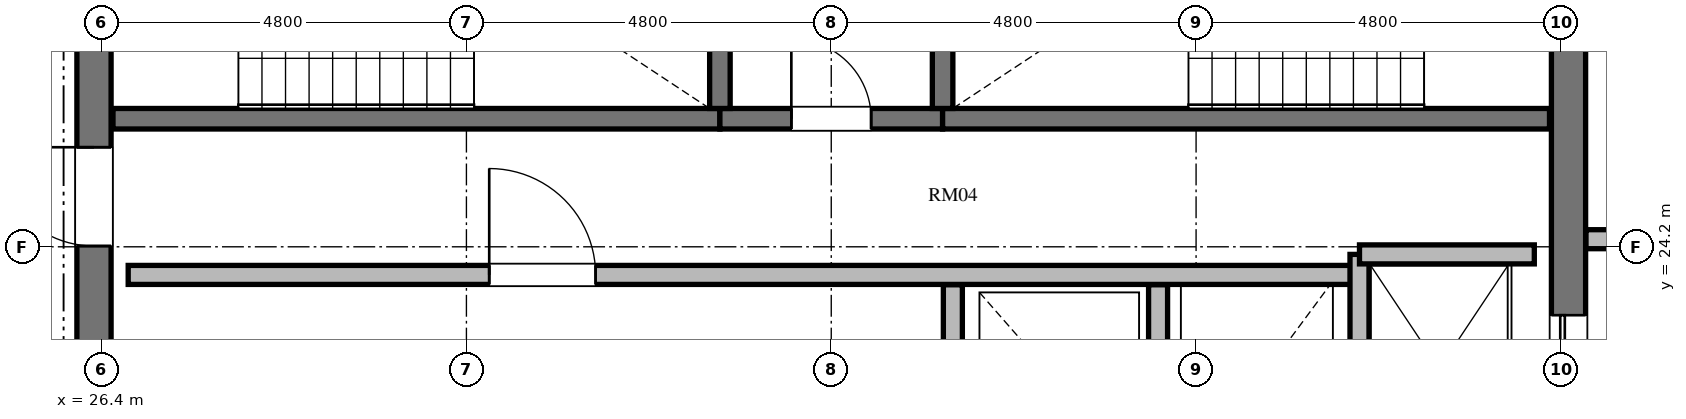
"""IFC4 building model, lengths in metres.
Left out: names, types, materials, properties, quantities, classifications, styles, units other than length and angle.
Written with IfcOpenShell. Run it as: python <this file> out.ifc"""

import sys

from ifc_helpers import new_model, si_unit, direction, frame, frame_2d, origin, place, context, subcontext, project, spatial, rectangle, extrude, element, fill, save


model = new_model("IFC4")
c1 = context("Model", 3, precision=1e-05, world=origin(), true_north=direction((0.0, 1.0)))
c2 = subcontext(c1, "Body", "Model", "MODEL_VIEW")
j1 = project(units=[si_unit("LENGTHUNIT", "METRE"), si_unit("PLANEANGLEUNIT", "RADIAN")], contexts=[c1])
p1 = place(None, origin())
s1 = spatial("IfcSite", under=j1, at=p1, CompositionType="ELEMENT")
p2 = place(p1, origin())
s2 = spatial("IfcBuilding", under=s1, at=p2, CompositionType="ELEMENT")
p3 = place(p2, frame((0.0, 0.0, 302.448)))
s3 = spatial("IfcBuildingStorey", under=s2, at=p3, CompositionType="ELEMENT", Elevation=302.448)
p4 = place(p3, frame((26.3, 20.95, 0.0), z_axis=(0.0, 0.0, 1.0), x_axis=(0.0, 1.0, 0.0)))
e1 = element("IfcWall", 1, at=p4, inside=s3, PredefinedType="SHEAR", context=c2, shape_type="SweptSolid", body=[
    extrude(rectangle(XDim=14.1, YDim=0.45, at=frame_2d((7.05, 0.0))), origin(), (0.0, 0.0, 1.0), 3.388),
])
p5 = place(p4, frame((6.5, 0.0, 0.0)))
e2 = element("IfcOpeningElement", 2, at=p5, cuts=e1, PredefinedType="OPENING", context=c2, shape_type="SweptSolid", body=[
    extrude(rectangle(XDim=1.2, YDim=2.15, at=frame_2d((0.6, 1.075))), frame((0.0, 0.235, 0.0), z_axis=(0.0, -1.0, 0.0), x_axis=(1.0, 0.0, 0.0)), (0.0, 0.0, 1.0), 0.47),
])
p6 = place(p4, frame((9.6, 0.0, 0.0)))
e3 = element("IfcOpeningElement", 3, at=p6, cuts=e1, PredefinedType="OPENING", context=c2, shape_type="SweptSolid", body=[
    extrude(rectangle(XDim=1.3, YDim=2.2, at=frame_2d((0.65, 1.1))), frame((0.0, 0.235, 0.0), z_axis=(0.0, -1.0, 0.0), x_axis=(1.0, 0.0, 0.0)), (0.0, 0.0, 1.0), 0.47),
])
p7 = place(p4, frame((3.26, 0.0, 0.0)))
e4 = element("IfcOpeningElement", 4, at=p7, cuts=e1, PredefinedType="OPENING", context=c2, shape_type="SweptSolid", body=[
    extrude(rectangle(XDim=1.3, YDim=2.2, at=frame_2d((0.65, 1.1))), frame((0.0, 0.235, 0.0), z_axis=(0.0, -1.0, 0.0), x_axis=(1.0, 0.0, 0.0)), (0.0, 0.0, 1.0), 0.47),
])
p8 = place(p3, frame((45.7, 20.95, 0.0), z_axis=(0.0, 0.0, 1.0), x_axis=(0.0, 1.0, 0.0)))
e5 = element("IfcWall", 5, at=p8, inside=s3, PredefinedType="SHEAR", context=c2, shape_type="SweptSolid", body=[
    extrude(rectangle(XDim=14.1, YDim=0.45, at=frame_2d((7.05, 0.0))), origin(), (0.0, 0.0, 1.0), 3.388),
])
p9 = place(p8, frame((11.75, 0.0, 0.0)))
e6 = element("IfcOpeningElement", 6, at=p9, cuts=e5, PredefinedType="OPENING", context=c2, shape_type="SweptSolid", body=[
    extrude(rectangle(XDim=1.4, YDim=2.3, at=frame_2d((0.7, 1.15))), frame((0.0, 0.235, 0.0), z_axis=(0.0, -1.0, 0.0), x_axis=(1.0, 0.0, 0.0)), (0.0, 0.0, 1.0), 0.47),
])
p10 = place(p8, frame((0.95, 0.0, 0.0)))
e7 = element("IfcOpeningElement", 7, at=p10, cuts=e5, PredefinedType="OPENING", context=c2, shape_type="SweptSolid", body=[
    extrude(rectangle(XDim=1.4, YDim=2.3, at=frame_2d((0.7, 1.15))), frame((0.0, 0.235, 0.0), z_axis=(0.0, -1.0, 0.0), x_axis=(1.0, 0.0, 0.0)), (0.0, 0.0, 1.0), 0.47),
])
p11 = place(p8, frame((9.48, 0.0, 0.0)))
e8 = element("IfcOpeningElement", 8, at=p11, cuts=e5, PredefinedType="OPENING", context=c2, shape_type="SweptSolid", body=[
    extrude(rectangle(XDim=1.1, YDim=2.15, at=frame_2d((0.55, 1.075))), frame((0.0, 0.235, 0.0), z_axis=(0.0, -1.0, 0.0), x_axis=(1.0, 0.0, 0.0)), (0.0, 0.0, 1.0), 0.47),
])
p12 = place(p3, frame((26.55, 25.885, 0.0), z_axis=(0.0, 0.0, 1.0), x_axis=(1.0, 0.0, 0.0)))
e9 = element("IfcWall", 9, at=p12, inside=s3, PredefinedType="SHEAR", context=c2, shape_type="SweptSolid", body=[
    extrude(rectangle(XDim=7.985, YDim=0.27, at=frame_2d((3.992, 0.0))), origin(), (0.0, 0.0, 1.0), 3.388),
])
p13 = place(p3, frame((34.535, 25.885, 0.0), z_axis=(0.0, 0.0, 1.0), x_axis=(1.0, 0.0, 0.0)))
e10 = element("IfcWall", 10, at=p13, inside=s3, PredefinedType="SHEAR", context=c2, shape_type="SweptSolid", body=[
    extrude(rectangle(XDim=2.93, YDim=0.27, at=frame_2d((1.465, 0.0))), origin(), (0.0, 0.0, 1.0), 3.388),
])
p14 = place(p13, frame((0.94, 0.0, 0.0)))
e11 = element("IfcOpeningElement", 11, at=p14, cuts=e10, PredefinedType="OPENING", context=c2, shape_type="SweptSolid", body=[
    extrude(rectangle(XDim=1.05, YDim=2.15, at=frame_2d((0.525, 1.075))), frame((0.0, 0.145, 0.0), z_axis=(0.0, -1.0, 0.0), x_axis=(1.0, 0.0, 0.0)), (0.0, 0.0, 1.0), 0.29),
])
p15 = place(p3, frame((37.465, 25.885, 0.0), z_axis=(0.0, 0.0, 1.0), x_axis=(1.0, 0.0, 0.0)))
e12 = element("IfcWall", 12, at=p15, inside=s3, PredefinedType="SHEAR", context=c2, shape_type="SweptSolid", body=[
    extrude(rectangle(XDim=7.985, YDim=0.27, at=frame_2d((3.992, 0.0))), origin(), (0.0, 0.0, 1.0), 3.388),
])
for number, where, z_axis, x_axis in (
    (13, (34.535, 26.02, 0.0), (0.0, 0.0, 1.0), (0.0, 1.0, 0.0)),
    (14, (37.465, 26.02, 0.0), (0.0, 0.0, 1.0), (0.0, 1.0, 0.0)),
):
    element("IfcWall", number, at=place(p3, frame(where, z_axis=z_axis, x_axis=x_axis)), inside=s3, PredefinedType="SHEAR", context=c2, shape_type="SweptSolid", body=[
        extrude(rectangle(XDim=4.08, YDim=0.27, at=frame_2d((2.04, 0.0))), origin(), (0.0, 0.0, 1.0), 3.388),
    ])
p16 = place(p3, frame((26.75, 23.83, 0.0), z_axis=(0.0, 0.0, 1.0), x_axis=(1.0, 0.0, 0.0)))
e15 = element("IfcWall", 15, at=p16, inside=s3, PredefinedType="SOLIDWALL", context=c2, shape_type="SweptSolid", body=[
    extrude(rectangle(XDim=16.2, YDim=0.25, at=frame_2d((8.1, 0.0))), origin(), (0.0, 0.0, 1.0), 3.068),
])
p17 = place(p16, frame((4.75, 0.0, 0.0)))
e16 = element("IfcOpeningElement", 16, at=p17, cuts=e15, PredefinedType="OPENING", context=c2, shape_type="SweptSolid", body=[
    extrude(rectangle(XDim=1.4, YDim=2.2, at=frame_2d((0.7, 1.1))), frame((0.0, 0.135, 0.0), z_axis=(0.0, -1.0, 0.0), x_axis=(1.0, 0.0, 0.0)), (0.0, 0.0, 1.0), 0.27),
])
p18 = place(p3, frame((42.95, 20.9, 0.0), z_axis=(0.0, 0.0, 1.0), x_axis=(0.0, 1.0, 0.0)))
e17 = element("IfcWall", 17, at=p18, inside=s3, PredefinedType="SOLIDWALL", context=c2, shape_type="SweptSolid", body=[
    extrude(rectangle(XDim=3.2, YDim=0.25, at=frame_2d((1.6, 0.0))), origin(), (0.0, 0.0, 1.0), 3.068),
])
p19 = place(p3, frame((42.95, 24.1, 0.0), z_axis=(0.0, 0.0, 1.0), x_axis=(1.0, 0.0, 0.0)))
e18 = element("IfcWall", 18, at=p19, inside=s3, PredefinedType="SOLIDWALL", context=c2, shape_type="SweptSolid", body=[
    extrude(rectangle(XDim=2.3, YDim=0.25, at=frame_2d((1.15, 0.0))), origin(), (0.0, 0.0, 1.0), 3.068),
])
for number, where, z_axis, x_axis in (
    (19, (37.6, 20.9, 0.0), (0.0, 0.0, 1.0), (0.0, 1.0, 0.0)),
    (20, (40.3, 20.9, 0.0), (0.0, 0.0, 1.0), (0.0, 1.0, 0.0)),
):
    element("IfcWall", number, at=place(p3, frame(where, z_axis=z_axis, x_axis=x_axis)), inside=s3, PredefinedType="SOLIDWALL", context=c2, shape_type="SweptSolid", body=[
        extrude(rectangle(XDim=2.8, YDim=0.25, at=frame_2d((1.4, 0.0))), origin(), (0.0, 0.0, 1.0), 3.068),
    ])
p20 = place(p3, frame((45.93, 24.3, 0.0), z_axis=(0.0, 0.0, 1.0), x_axis=(1.0, 0.0, 0.0)))
e21 = element("IfcWall", 21, at=p20, inside=s3, PredefinedType="SOLIDWALL", context=c2, shape_type="SweptSolid", body=[
    extrude(rectangle(XDim=2.52, YDim=0.25, at=frame_2d((1.26, 0.0))), origin(), (0.0, 0.0, 1.0), 3.068),
])
p21 = place(p14, origin())
e22 = element("IfcDoor", 22, at=p21, inside=s3, OperationType="SINGLE_SWING_LEFT", PredefinedType="DOOR", context=c2, shape_type="SweptSolid", body=[
    extrude(rectangle(XDim=1.05, YDim=2.15, at=frame_2d((0.525, 1.075))), frame((0.0, 0.025, 0.0), z_axis=(0.0, -1.0, 0.0), x_axis=(1.0, 0.0, 0.0)), (0.0, 0.0, 1.0), 0.05),
])
fill(e11, e22)
p22 = place(p7, origin())
e23 = element("IfcDoor", 23, at=p22, inside=s3, OperationType="SINGLE_SWING_RIGHT", PredefinedType="DOOR", context=c2, shape_type="SweptSolid", body=[
    extrude(rectangle(XDim=1.3, YDim=2.2, at=frame_2d((0.65, 1.1))), frame((0.0, 0.025, 0.0), z_axis=(0.0, -1.0, 0.0), x_axis=(1.0, 0.0, 0.0)), (0.0, 0.0, 1.0), 0.05),
])
fill(e4, e23)
p23 = place(p17, origin())
e24 = element("IfcDoor", 24, at=p23, inside=s3, OperationType="SINGLE_SWING_LEFT", PredefinedType="DOOR", context=c2, shape_type="SweptSolid", body=[
    extrude(rectangle(XDim=1.4, YDim=2.2, at=frame_2d((0.7, 1.1))), frame((0.0, 0.025, 0.0), z_axis=(0.0, -1.0, 0.0), x_axis=(1.0, 0.0, 0.0)), (0.0, 0.0, 1.0), 0.05),
])
fill(e16, e24)
p24 = place(p10, origin())
e25 = element("IfcDoor", 25, at=p24, inside=s3, OperationType="SLIDING_TO_LEFT", PredefinedType="DOOR", context=c2, shape_type="SweptSolid", body=[
    extrude(rectangle(XDim=1.4, YDim=2.3, at=frame_2d((0.7, 1.15))), frame((0.0, 0.025, 0.0), z_axis=(0.0, -1.0, 0.0), x_axis=(1.0, 0.0, 0.0)), (0.0, 0.0, 1.0), 0.05),
])
fill(e7, e25)
save(model, sys.argv[1])
